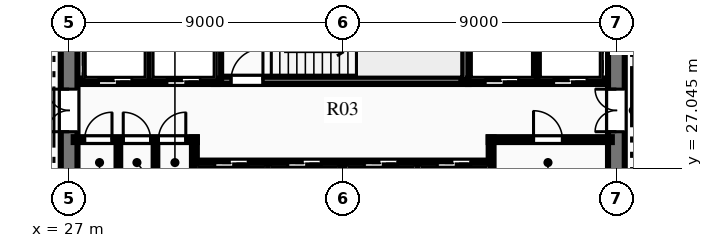
"""IFC4 building model, lengths in metres.
Left out: names, types, materials, properties, quantities, classifications, styles, units other than length and angle.
Written with IfcOpenShell. Run it as: python <this file> out.ifc"""

import sys

from ifc_helpers import new_model, si_unit, direction, frame, frame_2d, origin, place, context, subcontext, project, spatial, rectangle, extrude, element, fill, save


model = new_model("IFC4")
c1 = context("Model", 3, precision=1e-05, world=origin(), true_north=direction((0.0, 1.0)))
c2 = subcontext(c1, "Body", "Model", "MODEL_VIEW")
j1 = project(units=[si_unit("LENGTHUNIT", "METRE"), si_unit("PLANEANGLEUNIT", "RADIAN")], contexts=[c1])
p1 = place(None, origin())
s1 = spatial("IfcSite", under=j1, at=p1, CompositionType="ELEMENT")
p2 = place(p1, origin())
s2 = spatial("IfcBuilding", under=s1, at=p2, CompositionType="ELEMENT")
p3 = place(p2, frame((0.0, 0.0, 97.95)))
s3 = spatial("IfcBuildingStorey", under=s2, at=p3, CompositionType="ELEMENT", Elevation=97.95)
p4 = place(p3, frame((27.0, 18.275, 0.0), z_axis=(0.0, 0.0, 1.0), x_axis=(0.0, 1.0, 0.0)))
e1 = element("IfcWall", 1, at=p4, inside=s3, PredefinedType="SHEAR", context=c2, shape_type="SweptSolid", body=[
    extrude(rectangle(XDim=15.45, YDim=0.55, at=frame_2d((7.725, 0.0))), origin(), (0.0, 0.0, 1.0), 3.75),
])
p5 = place(p4, frame((9.965, 0.0, 0.0)))
e2 = element("IfcOpeningElement", 2, at=p5, cuts=e1, PredefinedType="OPENING", context=c2, shape_type="SweptSolid", body=[
    extrude(rectangle(XDim=1.4, YDim=2.2, at=frame_2d((0.7, 1.1))), frame((0.0, 0.285, 0.0), z_axis=(0.0, -1.0, 0.0), x_axis=(1.0, 0.0, 0.0)), (0.0, 0.0, 1.0), 0.57),
])
p6 = place(p3, frame((45.0, 18.275, 0.0), z_axis=(0.0, 0.0, 1.0), x_axis=(0.0, 1.0, 0.0)))
e3 = element("IfcWall", 3, at=p6, inside=s3, PredefinedType="SHEAR", context=c2, shape_type="SweptSolid", body=[
    extrude(rectangle(XDim=15.45, YDim=0.55, at=frame_2d((7.725, 0.0))), origin(), (0.0, 0.0, 1.0), 3.75),
])
p7 = place(p6, frame((9.965, 0.0, 0.0)))
e4 = element("IfcOpeningElement", 4, at=p7, cuts=e3, PredefinedType="OPENING", context=c2, shape_type="SweptSolid", body=[
    extrude(rectangle(XDim=1.4, YDim=2.2, at=frame_2d((0.7, 1.1))), frame((0.0, 0.285, 0.0), z_axis=(0.0, -1.0, 0.0), x_axis=(1.0, 0.0, 0.0)), (0.0, 0.0, 1.0), 0.57),
])
p8 = place(p3, frame((31.76, 29.93, 0.0), z_axis=(0.0, 0.0, 1.0), x_axis=(1.0, 0.0, 0.0)))
e5 = element("IfcWall", 5, at=p8, inside=s3, PredefinedType="SHEAR", context=c2, shape_type="SweptSolid", body=[
    extrude(rectangle(XDim=8.38, YDim=0.24, at=frame_2d((4.19, 0.0))), origin(), (0.0, 0.0, 1.0), 3.75),
])
p9 = place(p8, frame((0.565, 0.0, 0.0)))
e6 = element("IfcOpeningElement", 6, at=p9, cuts=e5, PredefinedType="OPENING", context=c2, shape_type="SweptSolid", body=[
    extrude(rectangle(XDim=1.05, YDim=2.15, at=frame_2d((0.525, 1.075))), frame((0.0, 0.13, 0.0), z_axis=(0.0, -1.0, 0.0), x_axis=(1.0, 0.0, 0.0)), (0.0, 0.0, 1.0), 0.26),
])
p10 = place(p3, frame((31.88, 29.93, 0.0), z_axis=(0.0, 0.0, 1.0), x_axis=(0.0, 1.0, 0.0)))
e7 = element("IfcWall", 7, at=p10, inside=s3, PredefinedType="SHEAR", context=c2, shape_type="SweptSolid", body=[
    extrude(rectangle(XDim=3.79, YDim=0.24, at=frame_2d((1.895, 0.0))), origin(), (0.0, 0.0, 1.0), 3.75),
])
p11 = place(p3, frame((40.02, 29.93, 0.0), z_axis=(0.0, 0.0, 1.0), x_axis=(0.0, 1.0, 0.0)))
e8 = element("IfcWall", 8, at=p11, inside=s3, PredefinedType="SHEAR", context=c2, shape_type="SweptSolid", body=[
    extrude(rectangle(XDim=3.85, YDim=0.24, at=frame_2d((1.925, 0.0))), origin(), (0.0, 0.0, 1.0), 3.75),
])
p12 = place(p3, frame((27.15, 27.98, 0.0), z_axis=(0.0, 0.0, 1.0), x_axis=(1.0, 0.0, 0.0)))
e9 = element("IfcWall", 9, at=p12, inside=s3, PredefinedType="PARTITIONING", context=c2, shape_type="SweptSolid", body=[
    extrude(rectangle(XDim=4.05, YDim=0.16, at=frame_2d((2.025, 0.0))), origin(), (0.0, 0.0, 1.0), 3.45),
])
p13 = place(p12, frame((0.36, 0.0, 0.0)))
e10 = element("IfcOpeningElement", 10, at=p13, cuts=e9, PredefinedType="OPENING", context=c2, shape_type="SweptSolid", body=[
    extrude(rectangle(XDim=0.9, YDim=2.15, at=frame_2d((0.45, 1.075))), frame((0.0, 0.09, 0.0), z_axis=(0.0, -1.0, 0.0), x_axis=(1.0, 0.0, 0.0)), (0.0, 0.0, 1.0), 0.18),
])
p14 = place(p12, frame((1.63, 0.0, 0.0)))
e11 = element("IfcOpeningElement", 11, at=p14, cuts=e9, PredefinedType="OPENING", context=c2, shape_type="SweptSolid", body=[
    extrude(rectangle(XDim=0.9, YDim=2.15, at=frame_2d((0.45, 1.075))), frame((0.0, 0.09, 0.0), z_axis=(0.0, -1.0, 0.0), x_axis=(1.0, 0.0, 0.0)), (0.0, 0.0, 1.0), 0.18),
])
p15 = place(p12, frame((2.788, 0.0, 0.0)))
e12 = element("IfcOpeningElement", 12, at=p15, cuts=e9, PredefinedType="OPENING", context=c2, shape_type="SweptSolid", body=[
    extrude(rectangle(XDim=0.9, YDim=2.15, at=frame_2d((0.45, 1.075))), frame((0.0, 0.09, 0.0), z_axis=(0.0, -1.0, 0.0), x_axis=(1.0, 0.0, 0.0)), (0.0, 0.0, 1.0), 0.18),
])
p16 = place(p3, frame((31.12, 26.54, 0.0), z_axis=(0.0, 0.0, 1.0), x_axis=(0.0, 1.0, 0.0)))
e13 = element("IfcWall", 13, at=p16, inside=s3, PredefinedType="PARTITIONING", context=c2, shape_type="SweptSolid", body=[
    extrude(rectangle(XDim=1.51, YDim=0.16, at=frame_2d((0.755, 0.0))), origin(), (0.0, 0.0, 1.0), 3.45),
])
p17 = place(p3, frame((40.8, 27.98, 0.0), z_axis=(0.0, 0.0, 1.0), x_axis=(1.0, 0.0, 0.0)))
e14 = element("IfcWall", 14, at=p17, inside=s3, PredefinedType="PARTITIONING", context=c2, shape_type="SweptSolid", body=[
    extrude(rectangle(XDim=4.05, YDim=0.16, at=frame_2d((2.025, 0.0))), origin(), (0.0, 0.0, 1.0), 3.45),
])
p18 = place(p17, frame((1.475, 0.0, 0.0)))
e15 = element("IfcOpeningElement", 15, at=p18, cuts=e14, PredefinedType="OPENING", context=c2, shape_type="SweptSolid", body=[
    extrude(rectangle(XDim=0.95, YDim=2.15, at=frame_2d((0.475, 1.075))), frame((0.0, 0.09, 0.0), z_axis=(0.0, -1.0, 0.0), x_axis=(1.0, 0.0, 0.0)), (0.0, 0.0, 1.0), 0.18),
])
p19 = place(p3, frame((40.88, 26.54, 0.0), z_axis=(0.0, 0.0, 1.0), x_axis=(0.0, 1.0, 0.0)))
e16 = element("IfcWall", 16, at=p19, inside=s3, PredefinedType="PARTITIONING", context=c2, shape_type="SweptSolid", body=[
    extrude(rectangle(XDim=1.51, YDim=0.16, at=frame_2d((0.755, 0.0))), origin(), (0.0, 0.0, 1.0), 3.45),
])
for number, where, z_axis, x_axis in (
    (17, (28.62, 26.54, 0.0), (0.0, 0.0, 1.0), (0.0, 1.0, 0.0)),
    (18, (29.84, 26.54, 0.0), (0.0, 0.0, 1.0), (0.0, 1.0, 0.0)),
):
    element("IfcWall", number, at=place(p3, frame(where, z_axis=z_axis, x_axis=x_axis)), inside=s3, PredefinedType="PARTITIONING", context=c2, shape_type="SweptSolid", body=[
        extrude(rectangle(XDim=1.44, YDim=0.12, at=frame_2d((0.72, 0.0))), origin(), (0.0, 0.0, 1.0), 3.45),
    ])
p20 = place(p3, frame((27.45, 29.9, 0.0), z_axis=(0.0, 0.0, 1.0), x_axis=(1.0, 0.0, 0.0)))
e19 = element("IfcWall", 19, at=p20, inside=s3, PredefinedType="PARTITIONING", context=c2, shape_type="SweptSolid", body=[
    extrude(rectangle(XDim=4.43, YDim=0.18, at=frame_2d((2.215, 0.0))), origin(), (0.0, 0.0, 1.0), 3.45),
])
p21 = place(p20, frame((0.515, 0.0, 0.0)))
e20 = element("IfcOpeningElement", 20, at=p21, cuts=e19, PredefinedType="OPENING", context=c2, shape_type="SweptSolid", body=[
    extrude(rectangle(XDim=1.1, YDim=2.15, at=frame_2d((0.55, 1.075))), frame((0.0, 0.1, 0.0), z_axis=(0.0, -1.0, 0.0), x_axis=(1.0, 0.0, 0.0)), (0.0, 0.0, 1.0), 0.2),
])
p22 = place(p20, frame((2.765, 0.0, 0.0)))
e21 = element("IfcOpeningElement", 21, at=p22, cuts=e19, PredefinedType="OPENING", context=c2, shape_type="SweptSolid", body=[
    extrude(rectangle(XDim=1.1, YDim=2.15, at=frame_2d((0.55, 1.075))), frame((0.0, 0.1, 0.0), z_axis=(0.0, -1.0, 0.0), x_axis=(1.0, 0.0, 0.0)), (0.0, 0.0, 1.0), 0.2),
])
p23 = place(p3, frame((29.63, 29.9, 0.0), z_axis=(0.0, 0.0, 1.0), x_axis=(0.0, 1.0, 0.0)))
e22 = element("IfcWall", 22, at=p23, inside=s3, PredefinedType="PARTITIONING", context=c2, shape_type="SweptSolid", body=[
    extrude(rectangle(XDim=3.75, YDim=0.18, at=frame_2d((1.875, 0.0))), origin(), (0.0, 0.0, 1.0), 3.45),
])
p24 = place(p3, frame((40.12, 29.9, 0.0), z_axis=(0.0, 0.0, 1.0), x_axis=(1.0, 0.0, 0.0)))
e23 = element("IfcWall", 23, at=p24, inside=s3, PredefinedType="PARTITIONING", context=c2, shape_type="SweptSolid", body=[
    extrude(rectangle(XDim=4.43, YDim=0.18, at=frame_2d((2.215, 0.0))), origin(), (0.0, 0.0, 1.0), 3.45),
])
p25 = place(p24, frame((0.565, 0.0, 0.0)))
e24 = element("IfcOpeningElement", 24, at=p25, cuts=e23, PredefinedType="OPENING", context=c2, shape_type="SweptSolid", body=[
    extrude(rectangle(XDim=1.1, YDim=2.15, at=frame_2d((0.55, 1.075))), frame((0.0, 0.1, 0.0), z_axis=(0.0, -1.0, 0.0), x_axis=(1.0, 0.0, 0.0)), (0.0, 0.0, 1.0), 0.2),
])
p26 = place(p24, frame((2.815, 0.0, 0.0)))
e25 = element("IfcOpeningElement", 25, at=p26, cuts=e23, PredefinedType="OPENING", context=c2, shape_type="SweptSolid", body=[
    extrude(rectangle(XDim=1.1, YDim=2.15, at=frame_2d((0.55, 1.075))), frame((0.0, 0.1, 0.0), z_axis=(0.0, -1.0, 0.0), x_axis=(1.0, 0.0, 0.0)), (0.0, 0.0, 1.0), 0.2),
])
p27 = place(p3, frame((42.37, 29.9, 0.0), z_axis=(0.0, 0.0, 1.0), x_axis=(0.0, 1.0, 0.0)))
e26 = element("IfcWall", 26, at=p27, inside=s3, PredefinedType="PARTITIONING", context=c2, shape_type="SweptSolid", body=[
    extrude(rectangle(XDim=3.75, YDim=0.18, at=frame_2d((1.875, 0.0))), origin(), (0.0, 0.0, 1.0), 3.45),
])
p28 = place(p3, frame((31.2, 27.2, 0.0), z_axis=(0.0, 0.0, 1.0), x_axis=(1.0, 0.0, 0.0)))
e27 = element("IfcWall", 27, at=p28, inside=s3, PredefinedType="PARTITIONING", context=c2, shape_type="SweptSolid", body=[
    extrude(rectangle(XDim=9.6, YDim=0.18, at=frame_2d((4.8, 0.0))), origin(), (0.0, 0.0, 1.0), 3.45),
])
p29 = place(p28, frame((0.59, 0.0, 0.0)))
e28 = element("IfcOpeningElement", 28, at=p29, cuts=e27, PredefinedType="OPENING", context=c2, shape_type="SweptSolid", body=[
    extrude(rectangle(XDim=1.1, YDim=2.15, at=frame_2d((0.55, 1.075))), frame((0.0, 0.1, 0.0), z_axis=(0.0, -1.0, 0.0), x_axis=(1.0, 0.0, 0.0)), (0.0, 0.0, 1.0), 0.2),
])
p30 = place(p28, frame((2.99, 0.0, 0.0)))
e29 = element("IfcOpeningElement", 29, at=p30, cuts=e27, PredefinedType="OPENING", context=c2, shape_type="SweptSolid", body=[
    extrude(rectangle(XDim=1.1, YDim=2.15, at=frame_2d((0.55, 1.075))), frame((0.0, 0.1, 0.0), z_axis=(0.0, -1.0, 0.0), x_axis=(1.0, 0.0, 0.0)), (0.0, 0.0, 1.0), 0.2),
])
p31 = place(p28, frame((5.51, 0.0, 0.0)))
e30 = element("IfcOpeningElement", 30, at=p31, cuts=e27, PredefinedType="OPENING", context=c2, shape_type="SweptSolid", body=[
    extrude(rectangle(XDim=1.1, YDim=2.15, at=frame_2d((0.55, 1.075))), frame((0.0, 0.1, 0.0), z_axis=(0.0, -1.0, 0.0), x_axis=(1.0, 0.0, 0.0)), (0.0, 0.0, 1.0), 0.2),
])
p32 = place(p28, frame((7.91, 0.0, 0.0)))
e31 = element("IfcOpeningElement", 31, at=p32, cuts=e27, PredefinedType="OPENING", context=c2, shape_type="SweptSolid", body=[
    extrude(rectangle(XDim=1.1, YDim=2.15, at=frame_2d((0.55, 1.075))), frame((0.0, 0.1, 0.0), z_axis=(0.0, -1.0, 0.0), x_axis=(1.0, 0.0, 0.0)), (0.0, 0.0, 1.0), 0.2),
])
for number, where, z_axis, x_axis in (
    (32, (33.54, 25.3, 0.0), (0.0, 0.0, 1.0), (0.0, 1.0, 0.0)),
    (33, (36.0, 25.3, 0.0), (0.0, 0.0, 1.0), (0.0, 1.0, 0.0)),
    (34, (38.46, 25.3, 0.0), (0.0, 0.0, 1.0), (0.0, 1.0, 0.0)),
):
    element("IfcWall", number, at=place(p3, frame(where, z_axis=z_axis, x_axis=x_axis)), inside=s3, PredefinedType="PARTITIONING", context=c2, shape_type="SweptSolid", body=[
        extrude(rectangle(XDim=1.9, YDim=0.18, at=frame_2d((0.95, 0.0))), origin(), (0.0, 0.0, 1.0), 3.45),
    ])
p33 = place(p13, origin())
e35 = element("IfcDoor", 35, at=p33, inside=s3, OperationType="SINGLE_SWING_RIGHT", PredefinedType="DOOR", context=c2, shape_type="SweptSolid", body=[
    extrude(rectangle(XDim=0.9, YDim=2.15, at=frame_2d((0.45, 1.075))), frame((0.0, 0.025, 0.0), z_axis=(0.0, -1.0, 0.0), x_axis=(1.0, 0.0, 0.0)), (0.0, 0.0, 1.0), 0.05),
])
fill(e10, e35)
p34 = place(p14, origin())
e36 = element("IfcDoor", 36, at=p34, inside=s3, OperationType="SINGLE_SWING_LEFT", PredefinedType="DOOR", context=c2, shape_type="SweptSolid", body=[
    extrude(rectangle(XDim=0.9, YDim=2.15, at=frame_2d((0.45, 1.075))), frame((0.0, 0.025, 0.0), z_axis=(0.0, -1.0, 0.0), x_axis=(1.0, 0.0, 0.0)), (0.0, 0.0, 1.0), 0.05),
])
fill(e11, e36)
p35 = place(p15, origin())
e37 = element("IfcDoor", 37, at=p35, inside=s3, OperationType="SINGLE_SWING_RIGHT", PredefinedType="DOOR", context=c2, shape_type="SweptSolid", body=[
    extrude(rectangle(XDim=0.9, YDim=2.15, at=frame_2d((0.45, 1.075))), frame((0.0, 0.025, 0.0), z_axis=(0.0, -1.0, 0.0), x_axis=(1.0, 0.0, 0.0)), (0.0, 0.0, 1.0), 0.05),
])
fill(e12, e37)
p36 = place(p18, origin())
e38 = element("IfcDoor", 38, at=p36, inside=s3, OperationType="SINGLE_SWING_LEFT", PredefinedType="DOOR", context=c2, shape_type="SweptSolid", body=[
    extrude(rectangle(XDim=0.95, YDim=2.15, at=frame_2d((0.475, 1.075))), frame((0.0, 0.025, 0.0), z_axis=(0.0, -1.0, 0.0), x_axis=(1.0, 0.0, 0.0)), (0.0, 0.0, 1.0), 0.05),
])
fill(e15, e38)
p37 = place(p9, origin())
e39 = element("IfcDoor", 39, at=p37, inside=s3, OperationType="SINGLE_SWING_RIGHT", PredefinedType="DOOR", context=c2, shape_type="SweptSolid", body=[
    extrude(rectangle(XDim=1.05, YDim=2.15, at=frame_2d((0.525, 1.075))), frame((0.0, 0.025, 0.0), z_axis=(0.0, -1.0, 0.0), x_axis=(1.0, 0.0, 0.0)), (0.0, 0.0, 1.0), 0.05),
])
fill(e6, e39)
p38 = place(p5, origin())
e40 = element("IfcDoor", 40, at=p38, inside=s3, OperationType="DOUBLE_DOOR_SINGLE_SWING", PredefinedType="DOOR", context=c2, shape_type="SweptSolid", body=[
    extrude(rectangle(XDim=1.4, YDim=2.2, at=frame_2d((0.7, 1.1))), frame((0.0, 0.025, 0.0), z_axis=(0.0, -1.0, 0.0), x_axis=(1.0, 0.0, 0.0)), (0.0, 0.0, 1.0), 0.05),
])
fill(e2, e40)
p39 = place(p7, origin())
e41 = element("IfcDoor", 41, at=p39, inside=s3, OperationType="DOUBLE_DOOR_SINGLE_SWING", PredefinedType="DOOR", context=c2, shape_type="SweptSolid", body=[
    extrude(rectangle(XDim=1.4, YDim=2.2, at=frame_2d((0.7, 1.1))), frame((0.0, 0.025, 0.0), z_axis=(0.0, -1.0, 0.0), x_axis=(1.0, 0.0, 0.0)), (0.0, 0.0, 1.0), 0.05),
])
fill(e4, e41)
p40 = place(p21, origin())
e42 = element("IfcDoor", 42, at=p40, inside=s3, OperationType="SLIDING_TO_LEFT", PredefinedType="DOOR", context=c2, shape_type="SweptSolid", body=[
    extrude(rectangle(XDim=1.1, YDim=2.15, at=frame_2d((0.55, 1.075))), frame((0.0, 0.025, 0.0), z_axis=(0.0, -1.0, 0.0), x_axis=(1.0, 0.0, 0.0)), (0.0, 0.0, 1.0), 0.05),
])
fill(e20, e42)
p41 = place(p22, origin())
e43 = element("IfcDoor", 43, at=p41, inside=s3, OperationType="SLIDING_TO_LEFT", PredefinedType="DOOR", context=c2, shape_type="SweptSolid", body=[
    extrude(rectangle(XDim=1.1, YDim=2.15, at=frame_2d((0.55, 1.075))), frame((0.0, 0.025, 0.0), z_axis=(0.0, -1.0, 0.0), x_axis=(1.0, 0.0, 0.0)), (0.0, 0.0, 1.0), 0.05),
])
fill(e21, e43)
p42 = place(p25, origin())
e44 = element("IfcDoor", 44, at=p42, inside=s3, OperationType="SLIDING_TO_LEFT", PredefinedType="DOOR", context=c2, shape_type="SweptSolid", body=[
    extrude(rectangle(XDim=1.1, YDim=2.15, at=frame_2d((0.55, 1.075))), frame((0.0, 0.025, 0.0), z_axis=(0.0, -1.0, 0.0), x_axis=(1.0, 0.0, 0.0)), (0.0, 0.0, 1.0), 0.05),
])
fill(e24, e44)
p43 = place(p26, origin())
e45 = element("IfcDoor", 45, at=p43, inside=s3, OperationType="SLIDING_TO_LEFT", PredefinedType="DOOR", context=c2, shape_type="SweptSolid", body=[
    extrude(rectangle(XDim=1.1, YDim=2.15, at=frame_2d((0.55, 1.075))), frame((0.0, 0.025, 0.0), z_axis=(0.0, -1.0, 0.0), x_axis=(1.0, 0.0, 0.0)), (0.0, 0.0, 1.0), 0.05),
])
fill(e25, e45)
p44 = place(p29, origin())
e46 = element("IfcDoor", 46, at=p44, inside=s3, OperationType="SLIDING_TO_LEFT", PredefinedType="DOOR", context=c2, shape_type="SweptSolid", body=[
    extrude(rectangle(XDim=1.1, YDim=2.15, at=frame_2d((0.55, 1.075))), frame((0.0, 0.025, 0.0), z_axis=(0.0, -1.0, 0.0), x_axis=(1.0, 0.0, 0.0)), (0.0, 0.0, 1.0), 0.05),
])
fill(e28, e46)
p45 = place(p30, origin())
e47 = element("IfcDoor", 47, at=p45, inside=s3, OperationType="SLIDING_TO_LEFT", PredefinedType="DOOR", context=c2, shape_type="SweptSolid", body=[
    extrude(rectangle(XDim=1.1, YDim=2.15, at=frame_2d((0.55, 1.075))), frame((0.0, 0.025, 0.0), z_axis=(0.0, -1.0, 0.0), x_axis=(1.0, 0.0, 0.0)), (0.0, 0.0, 1.0), 0.05),
])
fill(e29, e47)
p46 = place(p31, origin())
e48 = element("IfcDoor", 48, at=p46, inside=s3, OperationType="SLIDING_TO_LEFT", PredefinedType="DOOR", context=c2, shape_type="SweptSolid", body=[
    extrude(rectangle(XDim=1.1, YDim=2.15, at=frame_2d((0.55, 1.075))), frame((0.0, 0.025, 0.0), z_axis=(0.0, -1.0, 0.0), x_axis=(1.0, 0.0, 0.0)), (0.0, 0.0, 1.0), 0.05),
])
fill(e30, e48)
p47 = place(p32, origin())
e49 = element("IfcDoor", 49, at=p47, inside=s3, OperationType="SLIDING_TO_LEFT", PredefinedType="DOOR", context=c2, shape_type="SweptSolid", body=[
    extrude(rectangle(XDim=1.1, YDim=2.15, at=frame_2d((0.55, 1.075))), frame((0.0, 0.025, 0.0), z_axis=(0.0, -1.0, 0.0), x_axis=(1.0, 0.0, 0.0)), (0.0, 0.0, 1.0), 0.05),
])
fill(e31, e49)
save(model, sys.argv[1])
